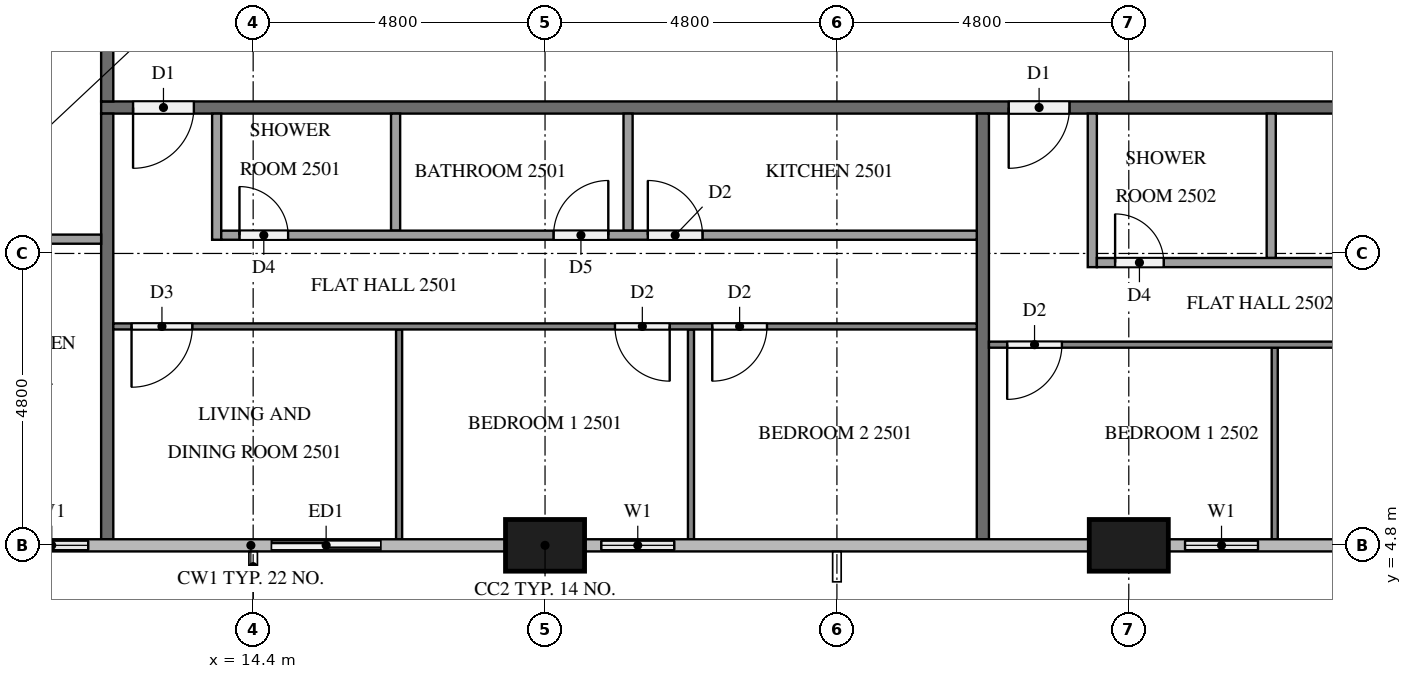
"""IFC4 building model, lengths in metres.
Left out: names, types, materials, properties, quantities, classifications, styles, units other than length and angle.
Written with IfcOpenShell. Run it as: python <this file> out.ifc"""

import sys

from ifc_helpers import new_model, si_unit, direction, frame, frame_2d, origin, origin_2d, place, context, subcontext, project, spatial, rectangle, extrude, element, fill, save


model = new_model("IFC4")
c1 = context("Model", 3, precision=1e-05, world=origin(), true_north=direction((0.0, 1.0)))
c2 = subcontext(c1, "Body", "Model", "MODEL_VIEW")
j1 = project(units=[si_unit("LENGTHUNIT", "METRE"), si_unit("PLANEANGLEUNIT", "RADIAN")], contexts=[c1])
p1 = place(None, origin())
s1 = spatial("IfcSite", under=j1, at=p1, CompositionType="ELEMENT")
p2 = place(p1, origin())
s2 = spatial("IfcBuilding", under=s1, at=p2, CompositionType="ELEMENT")
p3 = place(p2, frame((0.0, 0.0, 99.7)))
s3 = spatial("IfcBuildingStorey", under=s2, at=p3, CompositionType="ELEMENT", Elevation=99.7)
for number, where, z_axis, x_axis in (
    (1, (19.2, 4.8, 0.0), (0.0, 0.0, 1.0), (1.0, 0.0, 0.0)),
    (2, (28.8, 4.8, 0.0), (0.0, 0.0, 1.0), (1.0, 0.0, 0.0)),
):
    element("IfcColumn", number, at=place(p3, frame(where, z_axis=z_axis, x_axis=x_axis)), inside=s3, PredefinedType="COLUMN", context=c2, shape_type="SweptSolid", body=[
        extrude(rectangle(XDim=1.3, YDim=0.85, at=origin_2d()), origin(), (0.0, 0.0, 1.0), 3.2),
    ])
p4 = place(p3, frame((10.175, 4.8, 0.0), z_axis=(0.0, 0.0, 1.0), x_axis=(1.0, 0.0, 0.0)))
e3 = element("IfcWall", 3, at=p4, inside=s3, PredefinedType="SOLIDWALL", context=c2, shape_type="SweptSolid", body=[
    extrude(rectangle(XDim=1.825, YDim=0.15, at=frame_2d((0.913, 0.0))), origin(), (0.0, 0.0, 1.0), 3.2),
])
p5 = place(p4, frame((0.312, 0.0, 0.9)))
e4 = element("IfcOpeningElement", 4, at=p5, cuts=e3, PredefinedType="OPENING", context=c2, shape_type="SweptSolid", body=[
    extrude(rectangle(XDim=1.2, YDim=1.4, at=frame_2d((0.6, 0.7))), frame((0.0, 0.085, 0.0), z_axis=(0.0, -1.0, 0.0), x_axis=(1.0, 0.0, 0.0)), (0.0, 0.0, 1.0), 0.17),
])
p6 = place(p3, frame((14.4, 4.8, 0.0), z_axis=(0.0, 0.0, 1.0), x_axis=(1.0, 0.0, 0.0)))
e5 = element("IfcWall", 5, at=p6, inside=s3, PredefinedType="SOLIDWALL", context=c2, shape_type="SweptSolid", body=[
    extrude(rectangle(XDim=2.4, YDim=0.15, at=frame_2d((1.2, 0.0))), origin(), (0.0, 0.0, 1.0), 3.2),
])
p7 = place(p6, frame((0.3, 0.0, 0.0)))
e6 = element("IfcOpeningElement", 6, at=p7, cuts=e5, PredefinedType="OPENING", context=c2, shape_type="SweptSolid", body=[
    extrude(rectangle(XDim=1.8, YDim=2.4, at=frame_2d((0.9, 1.2))), frame((0.0, 0.085, 0.0), z_axis=(0.0, -1.0, 0.0), x_axis=(1.0, 0.0, 0.0)), (0.0, 0.0, 1.0), 0.17),
])
p8 = place(p3, frame((19.85, 4.8, 0.0), z_axis=(0.0, 0.0, 1.0), x_axis=(1.0, 0.0, 0.0)))
e7 = element("IfcWall", 7, at=p8, inside=s3, PredefinedType="SOLIDWALL", context=c2, shape_type="SweptSolid", body=[
    extrude(rectangle(XDim=1.75, YDim=0.15, at=frame_2d((0.875, 0.0))), origin(), (0.0, 0.0, 1.0), 3.2),
])
p9 = place(p8, frame((0.275, 0.0, 0.9)))
e8 = element("IfcOpeningElement", 8, at=p9, cuts=e7, PredefinedType="OPENING", context=c2, shape_type="SweptSolid", body=[
    extrude(rectangle(XDim=1.2, YDim=1.4, at=frame_2d((0.6, 0.7))), frame((0.0, 0.085, 0.0), z_axis=(0.0, -1.0, 0.0), x_axis=(1.0, 0.0, 0.0)), (0.0, 0.0, 1.0), 0.17),
])
p10 = place(p3, frame((29.45, 4.8, 0.0), z_axis=(0.0, 0.0, 1.0), x_axis=(1.0, 0.0, 0.0)))
e9 = element("IfcWall", 9, at=p10, inside=s3, PredefinedType="SOLIDWALL", context=c2, shape_type="SweptSolid", body=[
    extrude(rectangle(XDim=1.75, YDim=0.15, at=frame_2d((0.875, 0.0))), origin(), (0.0, 0.0, 1.0), 3.2),
])
p11 = place(p10, frame((0.275, 0.0, 0.9)))
e10 = element("IfcOpeningElement", 10, at=p11, cuts=e9, PredefinedType="OPENING", context=c2, shape_type="SweptSolid", body=[
    extrude(rectangle(XDim=1.2, YDim=1.4, at=frame_2d((0.6, 0.7))), frame((0.0, 0.085, 0.0), z_axis=(0.0, -1.0, 0.0), x_axis=(1.0, 0.0, 0.0)), (0.0, 0.0, 1.0), 0.17),
])
p12 = place(p3, frame((50.5, 12.0, 0.0), z_axis=(0.0, 0.0, 1.0), x_axis=(-1.0, 0.0, 0.0)))
e11 = element("IfcWall", 11, at=p12, inside=s3, PredefinedType="PARTITIONING", context=c2, shape_type="SweptSolid", body=[
    extrude(rectangle(XDim=38.6, YDim=0.2, at=frame_2d((19.3, 0.0))), origin(), (0.0, 0.0, 1.0), 3.2),
])
p13 = place(p12, frame((37.075, 0.0, 0.0)))
e12 = element("IfcOpeningElement", 12, at=p13, cuts=e11, PredefinedType="OPENING", context=c2, shape_type="SweptSolid", body=[
    extrude(rectangle(XDim=1.0, YDim=2.1, at=frame_2d((0.5, 1.05))), frame((0.0, 0.11, 0.0), z_axis=(0.0, -1.0, 0.0), x_axis=(1.0, 0.0, 0.0)), (0.0, 0.0, 1.0), 0.22),
])
p14 = place(p12, frame((22.675, 0.0, 0.0)))
e13 = element("IfcOpeningElement", 13, at=p14, cuts=e11, PredefinedType="OPENING", context=c2, shape_type="SweptSolid", body=[
    extrude(rectangle(XDim=1.0, YDim=2.1, at=frame_2d((0.5, 1.05))), frame((0.0, 0.11, 0.0), z_axis=(0.0, -1.0, 0.0), x_axis=(1.0, 0.0, 0.0)), (0.0, 0.0, 1.0), 0.22),
])
p15 = place(p12, frame((0.525, 0.0, 0.0)))
e14 = element("IfcOpeningElement", 14, at=p15, cuts=e11, PredefinedType="OPENING", context=c2, shape_type="SweptSolid", body=[
    extrude(rectangle(XDim=1.0, YDim=2.1, at=frame_2d((0.5, 1.05))), frame((0.0, 0.11, 0.0), z_axis=(0.0, -1.0, 0.0), x_axis=(1.0, 0.0, 0.0)), (0.0, 0.0, 1.0), 0.22),
])
p16 = place(p3, frame((12.0, 12.1, 0.0), z_axis=(0.0, 0.0, 1.0), x_axis=(0.0, 1.0, 0.0)))
e15 = element("IfcWall", 15, at=p16, inside=s3, PredefinedType="PARTITIONING", context=c2, shape_type="SweptSolid", body=[
    extrude(rectangle(XDim=2.8, YDim=0.2, at=frame_2d((1.4, 0.0))), origin(), (0.0, 0.0, 1.0), 3.2),
])
p17 = place(p16, frame((1.475, 0.0, 0.0)))
e16 = element("IfcOpeningElement", 16, at=p17, cuts=e15, PredefinedType="OPENING", context=c2, shape_type="SweptSolid", body=[
    extrude(rectangle(XDim=1.0, YDim=2.1, at=frame_2d((0.5, 1.05))), frame((0.0, 0.11, 0.0), z_axis=(0.0, -1.0, 0.0), x_axis=(1.0, 0.0, 0.0)), (0.0, 0.0, 1.0), 0.22),
])
for number, where, z_axis, x_axis in (
    (17, (26.4, 11.9, 0.0), (0.0, 0.0, 1.0), (0.0, -1.0, 0.0)),
    (18, (12.0, 4.9, 0.0), (0.0, 0.0, 1.0), (0.0, 1.0, 0.0)),
):
    element("IfcWall", number, at=place(p3, frame(where, z_axis=z_axis, x_axis=x_axis)), inside=s3, PredefinedType="PARTITIONING", context=c2, shape_type="SweptSolid", body=[
        extrude(rectangle(XDim=7.0, YDim=0.2, at=frame_2d((3.5, 0.0))), origin(), (0.0, 0.0, 1.0), 3.2),
    ])
for number, where, z_axis, x_axis in (
    (19, (16.8, 8.35, 0.0), (0.0, 0.0, 1.0), (0.0, -1.0, 0.0)),
    (20, (21.6, 8.35, 0.0), (0.0, 0.0, 1.0), (0.0, -1.0, 0.0)),
):
    element("IfcWall", number, at=place(p3, frame(where, z_axis=z_axis, x_axis=x_axis)), inside=s3, PredefinedType="PARTITIONING", context=c2, shape_type="SweptSolid", body=[
        extrude(rectangle(XDim=3.45, YDim=0.1, at=frame_2d((1.725, 0.0))), origin(), (0.0, 0.0, 1.0), 3.2),
    ])
p18 = place(p3, frame((26.3, 8.4, 0.0), z_axis=(0.0, 0.0, 1.0), x_axis=(-1.0, 0.0, 0.0)))
e21 = element("IfcWall", 21, at=p18, inside=s3, PredefinedType="PARTITIONING", context=c2, shape_type="SweptSolid", body=[
    extrude(rectangle(XDim=14.2, YDim=0.1, at=frame_2d((7.1, 0.0))), origin(), (0.0, 0.0, 1.0), 3.2),
])
p19 = place(p18, frame((12.9, 0.0, 0.0)))
e22 = element("IfcOpeningElement", 22, at=p19, cuts=e21, PredefinedType="OPENING", context=c2, shape_type="SweptSolid", body=[
    extrude(rectangle(XDim=1.0, YDim=2.1, at=frame_2d((0.5, 1.05))), frame((0.0, 0.06, 0.0), z_axis=(0.0, -1.0, 0.0), x_axis=(1.0, 0.0, 0.0)), (0.0, 0.0, 1.0), 0.12),
])
p20 = place(p18, frame((5.05, 0.0, 0.0)))
e23 = element("IfcOpeningElement", 23, at=p20, cuts=e21, PredefinedType="OPENING", context=c2, shape_type="SweptSolid", body=[
    extrude(rectangle(XDim=0.9, YDim=2.1, at=frame_2d((0.45, 1.05))), frame((0.0, 0.06, 0.0), z_axis=(0.0, -1.0, 0.0), x_axis=(1.0, 0.0, 0.0)), (0.0, 0.0, 1.0), 0.12),
])
p21 = place(p18, frame((3.45, 0.0, 0.0)))
e24 = element("IfcOpeningElement", 24, at=p21, cuts=e21, PredefinedType="OPENING", context=c2, shape_type="SweptSolid", body=[
    extrude(rectangle(XDim=0.9, YDim=2.1, at=frame_2d((0.45, 1.05))), frame((0.0, 0.06, 0.0), z_axis=(0.0, -1.0, 0.0), x_axis=(1.0, 0.0, 0.0)), (0.0, 0.0, 1.0), 0.12),
])
for number, where, z_axis, x_axis in (
    (25, (16.742, 11.9, 0.0), (0.0, 0.0, 1.0), (0.0, -1.0, 0.0)),
    (26, (20.565, 11.9, 0.0), (0.0, 0.0, 1.0), (0.0, -1.0, 0.0)),
):
    element("IfcWall", number, at=place(p3, frame(where, z_axis=z_axis, x_axis=x_axis)), inside=s3, PredefinedType="PARTITIONING", context=c2, shape_type="SweptSolid", body=[
        extrude(rectangle(XDim=1.925, YDim=0.15, at=frame_2d((0.962, 0.0))), origin(), (0.0, 0.0, 1.0), 3.2),
    ])
p22 = place(p3, frame((13.8, 11.9, 0.0), z_axis=(0.0, 0.0, 1.0), x_axis=(0.0, -1.0, 0.0)))
e27 = element("IfcWall", 27, at=p22, inside=s3, PredefinedType="PARTITIONING", context=c2, shape_type="SweptSolid", body=[
    extrude(rectangle(XDim=2.075, YDim=0.15, at=frame_2d((1.038, 0.0))), origin(), (0.0, 0.0, 1.0), 3.2),
])
p23 = place(p3, frame((13.875, 9.9, 0.0), z_axis=(0.0, 0.0, 1.0), x_axis=(1.0, 0.0, 0.0)))
e28 = element("IfcWall", 28, at=p23, inside=s3, PredefinedType="PARTITIONING", context=c2, shape_type="SweptSolid", body=[
    extrude(rectangle(XDim=12.425, YDim=0.15, at=frame_2d((6.212, 0.0))), origin(), (0.0, 0.0, 1.0), 3.2),
])
p24 = place(p23, frame((0.3, 0.0, 0.0)))
e29 = element("IfcOpeningElement", 29, at=p24, cuts=e28, PredefinedType="OPENING", context=c2, shape_type="SweptSolid", body=[
    extrude(rectangle(XDim=0.8, YDim=2.1, at=frame_2d((0.4, 1.05))), frame((0.0, 0.085, 0.0), z_axis=(0.0, -1.0, 0.0), x_axis=(1.0, 0.0, 0.0)), (0.0, 0.0, 1.0), 0.17),
])
p25 = place(p23, frame((5.465, 0.0, 0.0)))
e30 = element("IfcOpeningElement", 30, at=p25, cuts=e28, PredefinedType="OPENING", context=c2, shape_type="SweptSolid", body=[
    extrude(rectangle(XDim=0.9, YDim=2.1, at=frame_2d((0.45, 1.05))), frame((0.0, 0.085, 0.0), z_axis=(0.0, -1.0, 0.0), x_axis=(1.0, 0.0, 0.0)), (0.0, 0.0, 1.0), 0.17),
])
p26 = place(p23, frame((7.015, 0.0, 0.0)))
e31 = element("IfcOpeningElement", 31, at=p26, cuts=e28, PredefinedType="OPENING", context=c2, shape_type="SweptSolid", body=[
    extrude(rectangle(XDim=0.9, YDim=2.1, at=frame_2d((0.45, 1.05))), frame((0.0, 0.085, 0.0), z_axis=(0.0, -1.0, 0.0), x_axis=(1.0, 0.0, 0.0)), (0.0, 0.0, 1.0), 0.17),
])
p27 = place(p3, frame((31.2, 8.05, 0.0), z_axis=(0.0, 0.0, 1.0), x_axis=(0.0, -1.0, 0.0)))
e32 = element("IfcWall", 32, at=p27, inside=s3, PredefinedType="PARTITIONING", context=c2, shape_type="SweptSolid", body=[
    extrude(rectangle(XDim=3.15, YDim=0.1, at=frame_2d((1.575, 0.0))), origin(), (0.0, 0.0, 1.0), 3.2),
])
p28 = place(p3, frame((40.7, 8.1, 0.0), z_axis=(0.0, 0.0, 1.0), x_axis=(-1.0, 0.0, 0.0)))
e33 = element("IfcWall", 33, at=p28, inside=s3, PredefinedType="PARTITIONING", context=c2, shape_type="SweptSolid", body=[
    extrude(rectangle(XDim=14.2, YDim=0.1, at=frame_2d((7.1, 0.0))), origin(), (0.0, 0.0, 1.0), 3.2),
])
p29 = place(p28, frame((13.0, 0.0, 0.0)))
e34 = element("IfcOpeningElement", 34, at=p29, cuts=e33, PredefinedType="OPENING", context=c2, shape_type="SweptSolid", body=[
    extrude(rectangle(XDim=0.9, YDim=2.1, at=frame_2d((0.45, 1.05))), frame((0.0, 0.06, 0.0), z_axis=(0.0, -1.0, 0.0), x_axis=(1.0, 0.0, 0.0)), (0.0, 0.0, 1.0), 0.12),
])
p30 = place(p28, frame((5.05, 0.0, 0.0)))
e35 = element("IfcOpeningElement", 35, at=p30, cuts=e33, PredefinedType="OPENING", context=c2, shape_type="SweptSolid", body=[
    extrude(rectangle(XDim=1.0, YDim=2.1, at=frame_2d((0.5, 1.05))), frame((0.0, 0.06, 0.0), z_axis=(0.0, -1.0, 0.0), x_axis=(1.0, 0.0, 0.0)), (0.0, 0.0, 1.0), 0.12),
])
p31 = place(p28, frame((3.45, 0.0, 0.0)))
e36 = element("IfcOpeningElement", 36, at=p31, cuts=e33, PredefinedType="OPENING", context=c2, shape_type="SweptSolid", body=[
    extrude(rectangle(XDim=0.9, YDim=2.1, at=frame_2d((0.45, 1.05))), frame((0.0, 0.06, 0.0), z_axis=(0.0, -1.0, 0.0), x_axis=(1.0, 0.0, 0.0)), (0.0, 0.0, 1.0), 0.12),
])
p32 = place(p3, frame((31.142, 11.9, 0.0), z_axis=(0.0, 0.0, 1.0), x_axis=(0.0, -1.0, 0.0)))
e37 = element("IfcWall", 37, at=p32, inside=s3, PredefinedType="PARTITIONING", context=c2, shape_type="SweptSolid", body=[
    extrude(rectangle(XDim=2.375, YDim=0.15, at=frame_2d((1.188, 0.0))), origin(), (0.0, 0.0, 1.0), 3.2),
])
p33 = place(p3, frame((28.2, 11.9, 0.0), z_axis=(0.0, 0.0, 1.0), x_axis=(0.0, -1.0, 0.0)))
e38 = element("IfcWall", 38, at=p33, inside=s3, PredefinedType="PARTITIONING", context=c2, shape_type="SweptSolid", body=[
    extrude(rectangle(XDim=2.525, YDim=0.15, at=frame_2d((1.262, 0.0))), origin(), (0.0, 0.0, 1.0), 3.2),
])
p34 = place(p3, frame((28.275, 9.45, 0.0), z_axis=(0.0, 0.0, 1.0), x_axis=(1.0, 0.0, 0.0)))
e39 = element("IfcWall", 39, at=p34, inside=s3, PredefinedType="PARTITIONING", context=c2, shape_type="SweptSolid", body=[
    extrude(rectangle(XDim=12.425, YDim=0.15, at=frame_2d((6.212, 0.0))), origin(), (0.0, 0.0, 1.0), 3.2),
])
p35 = place(p34, frame((0.3, 0.0, 0.0)))
e40 = element("IfcOpeningElement", 40, at=p35, cuts=e39, PredefinedType="OPENING", context=c2, shape_type="SweptSolid", body=[
    extrude(rectangle(XDim=0.8, YDim=2.1, at=frame_2d((0.4, 1.05))), frame((0.0, 0.085, 0.0), z_axis=(0.0, -1.0, 0.0), x_axis=(1.0, 0.0, 0.0)), (0.0, 0.0, 1.0), 0.17),
])
p36 = place(p34, frame((7.377, 0.0, 0.0)))
e41 = element("IfcOpeningElement", 41, at=p36, cuts=e39, PredefinedType="OPENING", context=c2, shape_type="SweptSolid", body=[
    extrude(rectangle(XDim=0.9, YDim=2.1, at=frame_2d((0.45, 1.05))), frame((0.0, 0.085, 0.0), z_axis=(0.0, -1.0, 0.0), x_axis=(1.0, 0.0, 0.0)), (0.0, 0.0, 1.0), 0.17),
])
p37 = place(p34, frame((8.927, 0.0, 0.0)))
e42 = element("IfcOpeningElement", 42, at=p37, cuts=e39, PredefinedType="OPENING", context=c2, shape_type="SweptSolid", body=[
    extrude(rectangle(XDim=0.9, YDim=2.1, at=frame_2d((0.45, 1.05))), frame((0.0, 0.085, 0.0), z_axis=(0.0, -1.0, 0.0), x_axis=(1.0, 0.0, 0.0)), (0.0, 0.0, 1.0), 0.17),
])
p38 = place(p3, frame((11.9, 9.835, 0.0), z_axis=(0.0, 0.0, 1.0), x_axis=(-1.0, 0.0, 0.0)))
e43 = element("IfcWall", 43, at=p38, inside=s3, PredefinedType="PARTITIONING", context=c2, shape_type="SweptSolid", body=[
    extrude(rectangle(XDim=2.075, YDim=0.15, at=frame_2d((1.038, 0.0))), origin(), (0.0, 0.0, 1.0), 3.2),
])
p39 = place(p5, origin())
e44 = element("IfcWindow", 44, at=p39, inside=s3, PartitioningType="SINGLE_PANEL", PredefinedType="WINDOW", context=c2, shape_type="SweptSolid", body=[
    extrude(rectangle(XDim=1.2, YDim=1.4, at=frame_2d((0.6, 0.7))), frame((0.0, 0.03, 0.0), z_axis=(0.0, -1.0, 0.0), x_axis=(1.0, 0.0, 0.0)), (0.0, 0.0, 1.0), 0.06),
])
fill(e4, e44)
p40 = place(p7, origin())
e45 = element("IfcDoor", 45, at=p40, inside=s3, OperationType="SLIDING_TO_LEFT", PredefinedType="DOOR", context=c2, shape_type="SweptSolid", body=[
    extrude(rectangle(XDim=1.8, YDim=2.4, at=frame_2d((0.9, 1.2))), frame((0.0, 0.025, 0.0), z_axis=(0.0, -1.0, 0.0), x_axis=(1.0, 0.0, 0.0)), (0.0, 0.0, 1.0), 0.05),
])
fill(e6, e45)
p41 = place(p9, origin())
e46 = element("IfcWindow", 46, at=p41, inside=s3, PartitioningType="SINGLE_PANEL", PredefinedType="WINDOW", context=c2, shape_type="SweptSolid", body=[
    extrude(rectangle(XDim=1.2, YDim=1.4, at=frame_2d((0.6, 0.7))), frame((0.0, 0.03, 0.0), z_axis=(0.0, -1.0, 0.0), x_axis=(1.0, 0.0, 0.0)), (0.0, 0.0, 1.0), 0.06),
])
fill(e8, e46)
p42 = place(p11, origin())
e47 = element("IfcWindow", 47, at=p42, inside=s3, PartitioningType="SINGLE_PANEL", PredefinedType="WINDOW", context=c2, shape_type="SweptSolid", body=[
    extrude(rectangle(XDim=1.2, YDim=1.4, at=frame_2d((0.6, 0.7))), frame((0.0, 0.03, 0.0), z_axis=(0.0, -1.0, 0.0), x_axis=(1.0, 0.0, 0.0)), (0.0, 0.0, 1.0), 0.06),
])
fill(e10, e47)
p43 = place(p13, origin())
e48 = element("IfcDoor", 48, at=p43, inside=s3, OperationType="SINGLE_SWING_RIGHT", PredefinedType="DOOR", context=c2, shape_type="SweptSolid", body=[
    extrude(rectangle(XDim=1.0, YDim=2.1, at=frame_2d((0.5, 1.05))), frame((0.0, 0.025, 0.0), z_axis=(0.0, -1.0, 0.0), x_axis=(1.0, 0.0, 0.0)), (0.0, 0.0, 1.0), 0.05),
])
fill(e12, e48)
p44 = place(p14, origin())
e49 = element("IfcDoor", 49, at=p44, inside=s3, OperationType="SINGLE_SWING_RIGHT", PredefinedType="DOOR", context=c2, shape_type="SweptSolid", body=[
    extrude(rectangle(XDim=1.0, YDim=2.1, at=frame_2d((0.5, 1.05))), frame((0.0, 0.025, 0.0), z_axis=(0.0, -1.0, 0.0), x_axis=(1.0, 0.0, 0.0)), (0.0, 0.0, 1.0), 0.05),
])
fill(e13, e49)
p45 = place(p19, origin())
e50 = element("IfcDoor", 50, at=p45, inside=s3, OperationType="SINGLE_SWING_RIGHT", PredefinedType="DOOR", context=c2, shape_type="SweptSolid", body=[
    extrude(rectangle(XDim=1.0, YDim=2.1, at=frame_2d((0.5, 1.05))), frame((0.0, 0.025, 0.0), z_axis=(0.0, -1.0, 0.0), x_axis=(1.0, 0.0, 0.0)), (0.0, 0.0, 1.0), 0.05),
])
fill(e22, e50)
p46 = place(p20, origin())
e51 = element("IfcDoor", 51, at=p46, inside=s3, OperationType="SINGLE_SWING_LEFT", PredefinedType="DOOR", context=c2, shape_type="SweptSolid", body=[
    extrude(rectangle(XDim=0.9, YDim=2.1, at=frame_2d((0.45, 1.05))), frame((0.0, 0.025, 0.0), z_axis=(0.0, -1.0, 0.0), x_axis=(1.0, 0.0, 0.0)), (0.0, 0.0, 1.0), 0.05),
])
fill(e23, e51)
p47 = place(p21, origin())
e52 = element("IfcDoor", 52, at=p47, inside=s3, OperationType="SINGLE_SWING_RIGHT", PredefinedType="DOOR", context=c2, shape_type="SweptSolid", body=[
    extrude(rectangle(XDim=0.9, YDim=2.1, at=frame_2d((0.45, 1.05))), frame((0.0, 0.025, 0.0), z_axis=(0.0, -1.0, 0.0), x_axis=(1.0, 0.0, 0.0)), (0.0, 0.0, 1.0), 0.05),
])
fill(e24, e52)
p48 = place(p24, origin())
e53 = element("IfcDoor", 53, at=p48, inside=s3, OperationType="SINGLE_SWING_LEFT", PredefinedType="DOOR", context=c2, shape_type="SweptSolid", body=[
    extrude(rectangle(XDim=0.8, YDim=2.1, at=frame_2d((0.4, 1.05))), frame((0.0, 0.025, 0.0), z_axis=(0.0, -1.0, 0.0), x_axis=(1.0, 0.0, 0.0)), (0.0, 0.0, 1.0), 0.05),
])
fill(e29, e53)
p49 = place(p25, origin())
e54 = element("IfcDoor", 54, at=p49, inside=s3, OperationType="SINGLE_SWING_RIGHT", PredefinedType="DOOR", context=c2, shape_type="SweptSolid", body=[
    extrude(rectangle(XDim=0.9, YDim=2.1, at=frame_2d((0.45, 1.05))), frame((0.0, 0.025, 0.0), z_axis=(0.0, -1.0, 0.0), x_axis=(1.0, 0.0, 0.0)), (0.0, 0.0, 1.0), 0.05),
])
fill(e30, e54)
p50 = place(p26, origin())
e55 = element("IfcDoor", 55, at=p50, inside=s3, OperationType="SINGLE_SWING_LEFT", PredefinedType="DOOR", context=c2, shape_type="SweptSolid", body=[
    extrude(rectangle(XDim=0.9, YDim=2.1, at=frame_2d((0.45, 1.05))), frame((0.0, 0.025, 0.0), z_axis=(0.0, -1.0, 0.0), x_axis=(1.0, 0.0, 0.0)), (0.0, 0.0, 1.0), 0.05),
])
fill(e31, e55)
p51 = place(p29, origin())
e56 = element("IfcDoor", 56, at=p51, inside=s3, OperationType="SINGLE_SWING_RIGHT", PredefinedType="DOOR", context=c2, shape_type="SweptSolid", body=[
    extrude(rectangle(XDim=0.9, YDim=2.1, at=frame_2d((0.45, 1.05))), frame((0.0, 0.025, 0.0), z_axis=(0.0, -1.0, 0.0), x_axis=(1.0, 0.0, 0.0)), (0.0, 0.0, 1.0), 0.05),
])
fill(e34, e56)
p52 = place(p35, origin())
e57 = element("IfcDoor", 57, at=p52, inside=s3, OperationType="SINGLE_SWING_LEFT", PredefinedType="DOOR", context=c2, shape_type="SweptSolid", body=[
    extrude(rectangle(XDim=0.8, YDim=2.1, at=frame_2d((0.4, 1.05))), frame((0.0, 0.025, 0.0), z_axis=(0.0, -1.0, 0.0), x_axis=(1.0, 0.0, 0.0)), (0.0, 0.0, 1.0), 0.05),
])
fill(e40, e57)
save(model, sys.argv[1])
